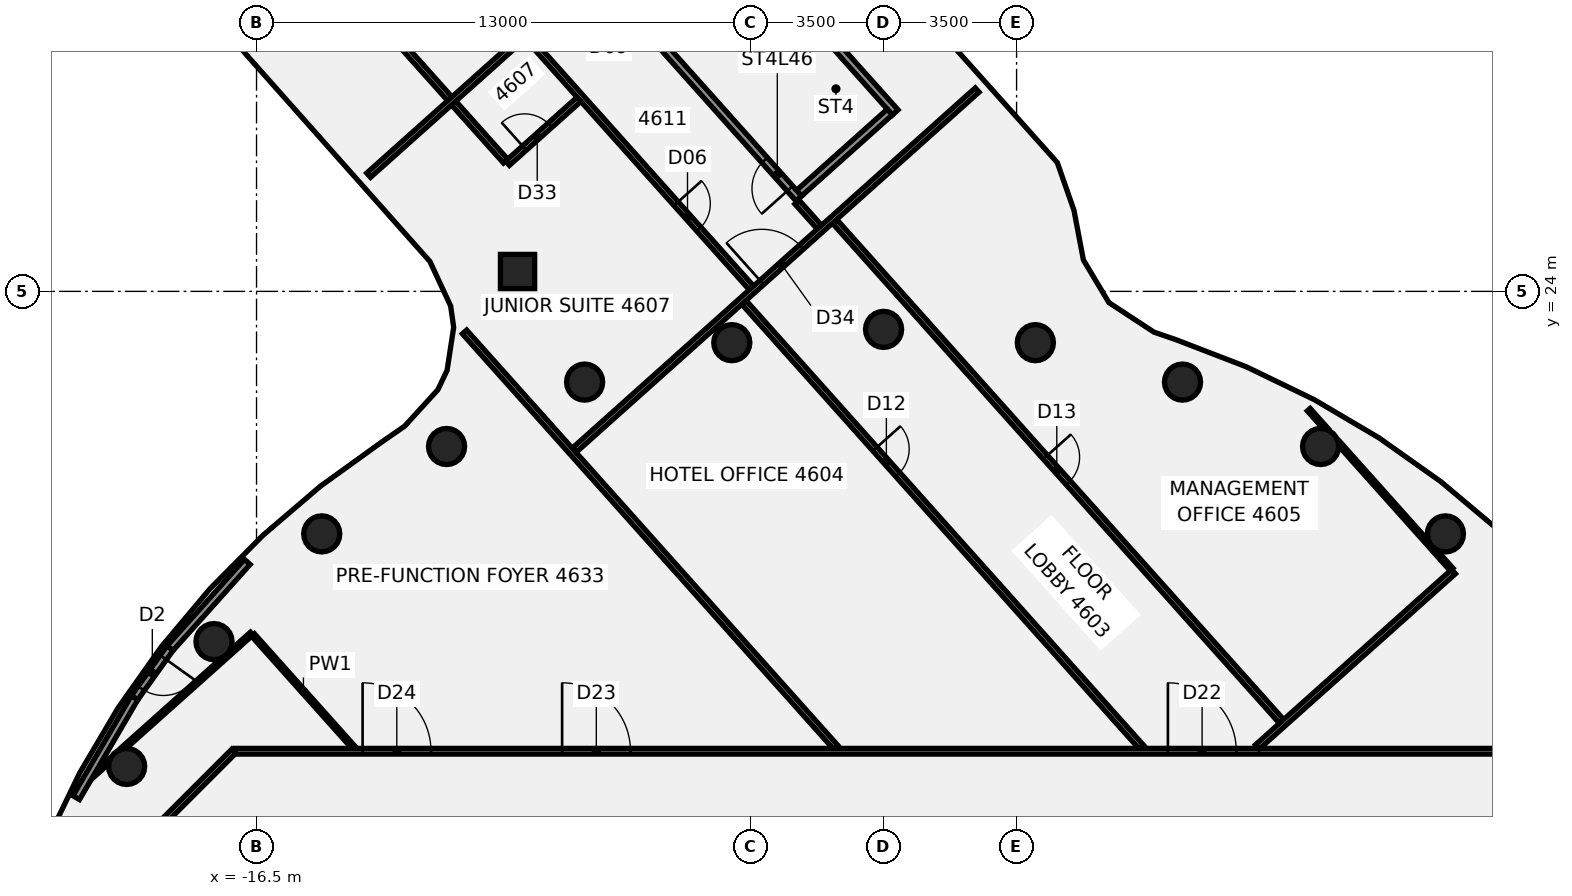
"""IFC4 building model, lengths in metres.
Left out: names, types, materials, properties, quantities, classifications, styles, units other than length and angle.
Written with IfcOpenShell. Run it as: python <this file> out.ifc"""

import sys

from ifc_helpers import new_model, si_unit, direction, frame, frame_2d, origin, origin_2d, place, context, subcontext, project, spatial, rectangle, circle, extrude, element, fill, save


model = new_model("IFC4")
c1 = context("Model", 3, precision=1e-05, world=origin(), true_north=direction((0.0, 1.0)))
c2 = subcontext(c1, "Body", "Model", "MODEL_VIEW")
j1 = project(units=[si_unit("LENGTHUNIT", "METRE"), si_unit("PLANEANGLEUNIT", "RADIAN")], contexts=[c1])
p1 = place(None, origin())
s1 = spatial("IfcSite", under=j1, at=p1, CompositionType="ELEMENT")
p2 = place(p1, origin())
s2 = spatial("IfcBuilding", under=s1, at=p2, CompositionType="ELEMENT")
p3 = place(p2, frame((0.0, 0.0, 186.1)))
s3 = spatial("IfcBuildingStorey", under=s2, at=p3, CompositionType="ELEMENT", Elevation=186.1)
for number, where, z_axis, x_axis in (
    (1, (14.784, 17.619, -0.14), (0.0, 0.0, 1.0), (1.0, 0.0, 0.0)),
    (2, (11.5, 19.919, -0.14), (0.0, 0.0, 1.0), (1.0, 0.0, 0.0)),
    (3, (7.866, 21.613, -0.14), (0.0, 0.0, 1.0), (1.0, 0.0, 0.0)),
    (4, (3.994, 22.651, -0.14), (0.0, 0.0, 1.0), (1.0, 0.0, 0.0)),
    (5, (0.0, 23.0, -0.14), (0.0, 0.0, 1.0), (1.0, 0.0, 0.0)),
    (6, (-3.994, 22.651, -0.14), (0.0, 0.0, 1.0), (1.0, 0.0, 0.0)),
    (7, (-7.866, 21.613, -0.14), (0.0, 0.0, 1.0), (1.0, 0.0, 0.0)),
    (8, (-11.5, 19.919, -0.14), (0.0, 0.0, 1.0), (1.0, 0.0, 0.0)),
    (9, (-14.784, 17.619, -0.14), (0.0, 0.0, 1.0), (1.0, 0.0, 0.0)),
    (10, (-17.619, 14.784, -0.14), (0.0, 0.0, 1.0), (1.0, 0.0, 0.0)),
    (11, (-19.919, 11.5, -0.14), (0.0, 0.0, 1.0), (1.0, 0.0, 0.0)),
):
    element("IfcColumn", number, at=place(p3, frame(where, z_axis=z_axis, x_axis=x_axis)), inside=s3, PredefinedType="COLUMN", context=c2, shape_type="SweptSolid", body=[
        extrude(circle(Radius=0.475, at=origin_2d()), origin(), (0.0, 0.0, 1.0), 3.6),
    ])
p4 = place(p3, frame((-9.632, 24.523, -0.139), z_axis=(-0.012268116842, -0.048801348764, 0.99873315839), x_axis=(0.744800990849, 0.66598299183, 0.041690989716)))
e12 = element("IfcColumn", 12, at=p4, inside=s3, PredefinedType="COLUMN", context=c2, shape_type="SweptSolid", body=[
    extrude(rectangle(XDim=0.9, YDim=0.9, at=origin_2d()), origin(), (0.0, 0.0, 1.0), 3.602),
])
p5 = place(p3, frame((-16.594, 14.959, 0.0), z_axis=(0.0, 0.0, 1.0), x_axis=(0.66652964255, -0.745478527928, 0.0)))
e13 = element("IfcWall", 13, at=p5, inside=s3, PredefinedType="PARTITIONING", context=c2, shape_type="SweptSolid", body=[
    extrude(rectangle(XDim=3.983, YDim=0.1, at=frame_2d((1.991, 0.0))), origin(), (0.0, 0.0, 1.0), 2.864),
])
p6 = place(p3, frame((-15.37, 37.394, 0.0), z_axis=(0.0, 0.0, 1.0), x_axis=(0.666444780656, -0.745554393949, 0.0)))
e14 = element("IfcWall", 14, at=p6, inside=s3, PredefinedType="PARTITIONING", context=c2, shape_type="SweptSolid", body=[
    extrude(rectangle(XDim=17.841, YDim=0.15, at=frame_2d((8.92, 0.0))), origin(), (0.0, 0.0, 1.0), 2.864),
])
p7 = place(p6, frame((14.871, 0.0, 0.0)))
e15 = element("IfcOpeningElement", 15, at=p7, cuts=e14, PredefinedType="OPENING", context=c2, shape_type="SweptSolid", body=[
    extrude(rectangle(XDim=0.9, YDim=2.1, at=frame_2d((0.45, 1.05))), frame((0.0, 0.085, 0.0), z_axis=(0.0, -1.0, 0.0), x_axis=(1.0, 0.0, 0.0)), (0.0, 0.0, 1.0), 0.17),
])
p8 = place(p6, frame((3.82, 0.0, 0.0)))
e16 = element("IfcOpeningElement", 16, at=p8, cuts=e14, PredefinedType="OPENING", context=c2, shape_type="SweptSolid", body=[
    extrude(rectangle(XDim=0.9, YDim=2.1, at=frame_2d((0.45, 1.05))), frame((0.0, 0.085, 0.0), z_axis=(0.0, -1.0, 0.0), x_axis=(1.0, 0.0, 0.0)), (0.0, 0.0, 1.0), 0.17),
])
p9 = place(p3, frame((-2.277, 26.348, 0.0), z_axis=(0.0, 0.0, 1.0), x_axis=(0.666291571948, -0.745691317605, 0.0)))
e17 = element("IfcWall", 17, at=p9, inside=s3, PredefinedType="PARTITIONING", context=c2, shape_type="SweptSolid", body=[
    extrude(rectangle(XDim=0.879, YDim=0.15, at=frame_2d((0.44, 0.0))), origin(), (0.0, 0.0, 1.0), 2.864),
])
p10 = place(p3, frame((-12.78, 30.595, 0.0), z_axis=(0.0, 0.0, 1.0), x_axis=(0.666724335907, -0.745304407547, 0.0)))
e18 = element("IfcWall", 18, at=p10, inside=s3, PredefinedType="PARTITIONING", context=c2, shape_type="SweptSolid", body=[
    extrude(rectangle(XDim=4.25, YDim=0.15, at=frame_2d((2.125, 0.0))), origin(), (0.0, 0.0, 1.0), 2.864),
])
p11 = place(p3, frame((-11.027, 22.932, 0.0), z_axis=(0.0, 0.0, 1.0), x_axis=(0.666397804254, -0.745596383096, 0.0)))
e19 = element("IfcWall", 19, at=p11, inside=s3, PredefinedType="PARTITIONING", context=c2, shape_type="SweptSolid", body=[
    extrude(rectangle(XDim=14.652, YDim=0.15, at=frame_2d((7.326, 0.0))), origin(), (0.0, 0.0, 1.0), 2.864),
])
p12 = place(p3, frame((-3.672, 23.708, 0.0), z_axis=(0.0, 0.0, 1.0), x_axis=(0.666408651831, -0.745586687626, 0.0)))
e20 = element("IfcWall", 20, at=p12, inside=s3, PredefinedType="PARTITIONING", context=c2, shape_type="SweptSolid", body=[
    extrude(rectangle(XDim=15.692, YDim=0.15, at=frame_2d((7.846, 0.0))), origin(), (0.0, 0.0, 1.0), 2.864),
])
p13 = place(p12, frame((5.17, 0.0, 0.0)))
e21 = element("IfcOpeningElement", 21, at=p13, cuts=e20, PredefinedType="OPENING", context=c2, shape_type="SweptSolid", body=[
    extrude(rectangle(XDim=0.9, YDim=2.1, at=frame_2d((0.45, 1.05))), frame((0.0, 0.085, 0.0), z_axis=(0.0, -1.0, 0.0), x_axis=(1.0, 0.0, 0.0)), (0.0, 0.0, 1.0), 0.17),
])
p14 = place(p3, frame((-1.287, 25.839, 0.0), z_axis=(0.0, 0.0, 1.0), x_axis=(0.666445254809, -0.745553970107, 0.0)))
e22 = element("IfcWall", 22, at=p14, inside=s3, PredefinedType="PARTITIONING", context=c2, shape_type="SweptSolid", body=[
    extrude(rectangle(XDim=17.64, YDim=0.15, at=frame_2d((8.82, 0.0))), origin(), (0.0, 0.0, 1.0), 2.864),
])
p15 = place(p14, frame((8.32, 0.0, 0.0)))
e23 = element("IfcOpeningElement", 23, at=p15, cuts=e22, PredefinedType="OPENING", context=c2, shape_type="SweptSolid", body=[
    extrude(rectangle(XDim=0.9, YDim=2.1, at=frame_2d((0.45, 1.05))), frame((0.0, 0.085, 0.0), z_axis=(0.0, -1.0, 0.0), x_axis=(1.0, 0.0, 0.0)), (0.0, 0.0, 1.0), 0.17),
])
p16 = place(p3, frame((11.188, 20.888, 0.0), z_axis=(0.0, 0.0, 1.0), x_axis=(0.666420937465, -0.74557570649, 0.0)))
e24 = element("IfcWall", 24, at=p16, inside=s3, PredefinedType="PARTITIONING", context=c2, shape_type="SweptSolid", body=[
    extrude(rectangle(XDim=0.706, YDim=0.1, at=frame_2d((0.353, 0.0))), origin(), (0.0, 0.0, 1.0), 2.864),
])
p17 = place(p3, frame((11.955, 20.029, 0.0), z_axis=(0.0, 0.0, 1.0), x_axis=(0.666367019428, -0.745623896759, 0.0)))
e25 = element("IfcWall", 25, at=p17, inside=s3, PredefinedType="PARTITIONING", context=c2, shape_type="SweptSolid", body=[
    extrude(rectangle(XDim=4.488, YDim=0.1, at=frame_2d((2.244, 0.0))), origin(), (0.0, 0.0, 1.0), 2.864),
])
p18 = place(p3, frame((-17.065, 11.9, 0.0), z_axis=(0.0, 0.0, 1.0), x_axis=(1.0, 0.0, 0.0)))
e26 = element("IfcWall", 26, at=p18, inside=s3, PredefinedType="PARTITIONING", context=c2, shape_type="SweptSolid", body=[
    extrude(rectangle(XDim=34.165, YDim=0.15, at=frame_2d((17.083, 0.0))), origin(), (0.0, 0.0, 1.0), 2.864),
])
p19 = place(p18, frame((24.547, 0.0, 0.0)))
e27 = element("IfcOpeningElement", 27, at=p19, cuts=e26, PredefinedType="OPENING", context=c2, shape_type="SweptSolid", body=[
    extrude(rectangle(XDim=1.8, YDim=2.1, at=frame_2d((0.9, 1.05))), frame((0.0, 0.085, 0.0), z_axis=(0.0, -1.0, 0.0), x_axis=(1.0, 0.0, 0.0)), (0.0, 0.0, 1.0), 0.17),
])
p20 = place(p18, frame((8.606, 0.0, 0.0)))
e28 = element("IfcOpeningElement", 28, at=p20, cuts=e26, PredefinedType="OPENING", context=c2, shape_type="SweptSolid", body=[
    extrude(rectangle(XDim=1.8, YDim=2.1, at=frame_2d((0.9, 1.05))), frame((0.0, 0.085, 0.0), z_axis=(0.0, -1.0, 0.0), x_axis=(1.0, 0.0, 0.0)), (0.0, 0.0, 1.0), 0.17),
])
p21 = place(p18, frame((3.356, 0.0, 0.0)))
e29 = element("IfcOpeningElement", 29, at=p21, cuts=e26, PredefinedType="OPENING", context=c2, shape_type="SweptSolid", body=[
    extrude(rectangle(XDim=1.8, YDim=2.1, at=frame_2d((0.9, 1.05))), frame((0.0, 0.085, 0.0), z_axis=(0.0, -1.0, 0.0), x_axis=(1.0, 0.0, 0.0)), (0.0, 0.0, 1.0), 0.17),
])
p22 = place(p3, frame((-20.888, 11.188, 0.0), z_axis=(0.0, 0.0, 1.0), x_axis=(0.74557570649, 0.666420937465, 0.0)))
e30 = element("IfcWall", 30, at=p22, inside=s3, PredefinedType="PARTITIONING", context=c2, shape_type="SweptSolid", body=[
    extrude(rectangle(XDim=0.706, YDim=0.1, at=frame_2d((0.353, 0.0))), origin(), (0.0, 0.0, 1.0), 2.864),
])
p23 = place(p3, frame((-20.029, 11.955, 0.0), z_axis=(0.0, 0.0, 1.0), x_axis=(0.745614810603, 0.666377186141, 0.0)))
e31 = element("IfcWall", 31, at=p23, inside=s3, PredefinedType="PARTITIONING", context=c2, shape_type="SweptSolid", body=[
    extrude(rectangle(XDim=4.563, YDim=0.1, at=frame_2d((2.282, 0.0))), origin(), (0.0, 0.0, 1.0), 2.864),
])
p24 = place(p3, frame((-13.55, 27.057, 0.0), z_axis=(0.0, 0.0, 1.0), x_axis=(0.745704850379, 0.666276426208, 0.0)))
e32 = element("IfcWall", 32, at=p24, inside=s3, PredefinedType="PARTITIONING", context=c2, shape_type="SweptSolid", body=[
    extrude(rectangle(XDim=5.453, YDim=0.15, at=frame_2d((2.727, 0.0))), origin(), (0.0, 0.0, 1.0), 2.864),
])
p25 = place(p3, frame((-9.897, 27.371, 0.0), z_axis=(0.0, 0.0, 1.0), x_axis=(0.745631512628, 0.666358497639, 0.0)))
e33 = element("IfcWall", 33, at=p25, inside=s3, PredefinedType="PARTITIONING", context=c2, shape_type="SweptSolid", body=[
    extrude(rectangle(XDim=2.519, YDim=0.15, at=frame_2d((1.26, 0.0))), origin(), (0.0, 0.0, 1.0), 2.864),
])
p26 = place(p25, frame((0.6, 0.0, 0.0)))
e34 = element("IfcOpeningElement", 34, at=p26, cuts=e33, PredefinedType="OPENING", context=c2, shape_type="SweptSolid", body=[
    extrude(rectangle(XDim=0.9, YDim=2.1, at=frame_2d((0.45, 1.05))), frame((0.0, 0.085, 0.0), z_axis=(0.0, -1.0, 0.0), x_axis=(1.0, 0.0, 0.0)), (0.0, 0.0, 1.0), 0.17),
])
p27 = place(p3, frame((-8.139, 19.821, 0.0), z_axis=(0.0, 0.0, 1.0), x_axis=(0.745582042357, 0.666413848982, 0.0)))
e35 = element("IfcWall", 35, at=p27, inside=s3, PredefinedType="PARTITIONING", context=c2, shape_type="SweptSolid", body=[
    extrude(rectangle(XDim=14.219, YDim=0.15, at=frame_2d((7.11, 0.0))), origin(), (0.0, 0.0, 1.0), 2.864),
])
p28 = place(p27, frame((6.62, 0.0, 0.0)))
e36 = element("IfcOpeningElement", 36, at=p28, cuts=e35, PredefinedType="OPENING", context=c2, shape_type="SweptSolid", body=[
    extrude(rectangle(XDim=1.4, YDim=2.1, at=frame_2d((0.7, 1.05))), frame((0.0, 0.085, 0.0), z_axis=(0.0, -1.0, 0.0), x_axis=(1.0, 0.0, 0.0)), (0.0, 0.0, 1.0), 0.17),
])
p29 = place(p3, frame((9.835, 12.013, 0.0), z_axis=(0.0, 0.0, 1.0), x_axis=(0.745799986643, 0.666169933218, 0.0)))
e37 = element("IfcWall", 37, at=p29, inside=s3, PredefinedType="PARTITIONING", context=c2, shape_type="SweptSolid", body=[
    extrude(rectangle(XDim=6.923, YDim=0.15, at=frame_2d((3.461, 0.0))), origin(), (0.0, 0.0, 1.0), 2.864),
])
p30 = place(p3, frame((-18.872, 10.128, 0.0), z_axis=(0.0, 0.0, 1.0), x_axis=(0.707106781187, 0.707106781187, 0.0)))
e38 = element("IfcWall", 38, at=p30, inside=s3, PredefinedType="PARTITIONING", context=c2, shape_type="SweptSolid", body=[
    extrude(rectangle(XDim=2.505, YDim=0.15, at=frame_2d((1.253, 0.0))), origin(), (0.0, 0.0, 1.0), 2.864),
])
p31 = place(p3, frame((-16.743, 16.881, 0.0), z_axis=(0.0, 0.0, 1.0), x_axis=(-0.667237213311, -0.744845286736, 0.0)))
e39 = element("IfcWall", 39, at=p31, inside=s3, PredefinedType="SOLIDWALL", context=c2, shape_type="SweptSolid", body=[
    extrude(rectangle(XDim=3.048, YDim=0.2, at=frame_2d((1.524, 0.0))), origin(), (0.0, 0.0, 1.0), 3.46),
])
p32 = place(p3, frame((-19.708, 13.309, 0.0), z_axis=(0.0, 0.0, 1.0), x_axis=(-0.504682807399, -0.863304849932, 0.0)))
e40 = element("IfcWall", 40, at=p32, inside=s3, PredefinedType="SOLIDWALL", context=c2, shape_type="SweptSolid", body=[
    extrude(rectangle(XDim=3.047, YDim=0.2, at=frame_2d((1.523, 0.0))), origin(), (0.0, 0.0, 1.0), 3.46),
])
p33 = place(p3, frame((-18.777, 14.611, 0.0), z_axis=(0.0, 0.0, 1.0), x_axis=(-0.58162792214, -0.81345495277, 0.0)))
e41 = element("IfcWall", 41, at=p33, inside=s3, PredefinedType="SOLIDWALL", context=c2, shape_type="SweptSolid", body=[
    extrude(rectangle(XDim=1.6, YDim=0.2, at=frame_2d((0.8, 0.0))), origin(), (0.0, 0.0, 1.0), 3.46),
])
p34 = place(p33, frame((0.3, 0.0, 0.0)))
e42 = element("IfcOpeningElement", 42, at=p34, cuts=e41, PredefinedType="OPENING", context=c2, shape_type="SweptSolid", body=[
    extrude(rectangle(XDim=1.0, YDim=2.4, at=frame_2d((0.5, 1.2))), frame((0.0, 0.11, 0.0), z_axis=(0.0, -1.0, 0.0), x_axis=(1.0, 0.0, 0.0)), (0.0, 0.0, 1.0), 0.22),
])
p35 = place(p3, frame((-2.229, 26.445, -0.14), z_axis=(0.0, 0.0, 1.0), x_axis=(-0.666426243164, 0.745570964042, 0.0)))
e43 = element("IfcWall", 43, at=p35, inside=s3, PredefinedType="SHEAR", context=c2, shape_type="SweptSolid", body=[
    extrude(rectangle(XDim=6.7, YDim=0.2, at=frame_2d((3.35, 0.0))), origin(), (0.0, 0.0, 1.0), 3.004),
])
p36 = place(p35, frame((0.35, 0.0, 0.0)))
e44 = element("IfcOpeningElement", 44, at=p36, cuts=e43, PredefinedType="OPENING", context=c2, shape_type="SweptSolid", body=[
    extrude(rectangle(XDim=1.0, YDim=2.1, at=frame_2d((0.5, 1.05))), frame((0.0, 0.11, 0.0), z_axis=(0.0, -1.0, 0.0), x_axis=(1.0, 0.0, 0.0)), (0.0, 0.0, 1.0), 0.22),
])
p37 = place(p3, frame((0.305, 28.711, -0.14), z_axis=(0.0, 0.0, 1.0), x_axis=(-0.666446497792, 0.745552859012, 0.0)))
e45 = element("IfcWall", 45, at=p37, inside=s3, PredefinedType="SHEAR", context=c2, shape_type="SweptSolid", body=[
    extrude(rectangle(XDim=6.7, YDim=0.2, at=frame_2d((3.35, 0.0))), origin(), (0.0, 0.0, 1.0), 3.004),
])
p38 = place(p3, frame((0.164, 28.719, -0.14), z_axis=(0.0, 0.0, 1.0), x_axis=(-0.745520592409, -0.666482592641, 0.0)))
e46 = element("IfcWall", 46, at=p38, inside=s3, PredefinedType="SHEAR", context=c2, shape_type="SweptSolid", body=[
    extrude(rectangle(XDim=3.2, YDim=0.2, at=frame_2d((1.6, 0.0))), origin(), (0.0, 0.0, 1.0), 3.004),
])
p39 = place(p7, frame((0.9, 0.0, 0.0), z_axis=(0.0, 0.0, 1.0), x_axis=(-1.0, 0.0, 0.0)))
e47 = element("IfcDoor", 47, at=p39, inside=s3, OperationType="SINGLE_SWING_RIGHT", PredefinedType="DOOR", context=c2, shape_type="SweptSolid", body=[
    extrude(rectangle(XDim=0.9, YDim=2.1, at=frame_2d((0.45, 1.05))), frame((0.0, 0.025, 0.0), z_axis=(0.0, -1.0, 0.0), x_axis=(1.0, 0.0, 0.0)), (0.0, 0.0, 1.0), 0.05),
])
fill(e15, e47)
p40 = place(p13, frame((0.9, 0.0, 0.0), z_axis=(0.0, 0.0, 1.0), x_axis=(-1.0, 0.0, 0.0)))
e48 = element("IfcDoor", 48, at=p40, inside=s3, OperationType="SINGLE_SWING_LEFT", PredefinedType="DOOR", context=c2, shape_type="SweptSolid", body=[
    extrude(rectangle(XDim=0.9, YDim=2.1, at=frame_2d((0.45, 1.05))), frame((0.0, 0.025, 0.0), z_axis=(0.0, -1.0, 0.0), x_axis=(1.0, 0.0, 0.0)), (0.0, 0.0, 1.0), 0.05),
])
fill(e21, e48)
p41 = place(p15, origin())
e49 = element("IfcDoor", 49, at=p41, inside=s3, OperationType="SINGLE_SWING_RIGHT", PredefinedType="DOOR", context=c2, shape_type="SweptSolid", body=[
    extrude(rectangle(XDim=0.9, YDim=2.1, at=frame_2d((0.45, 1.05))), frame((0.0, 0.025, 0.0), z_axis=(0.0, -1.0, 0.0), x_axis=(1.0, 0.0, 0.0)), (0.0, 0.0, 1.0), 0.05),
])
fill(e23, e49)
p42 = place(p19, frame((1.8, 0.0, 0.0), z_axis=(0.0, 0.0, 1.0), x_axis=(-1.0, 0.0, 0.0)))
e50 = element("IfcDoor", 50, at=p42, inside=s3, OperationType="DOUBLE_DOOR_SINGLE_SWING", PredefinedType="DOOR", context=c2, shape_type="SweptSolid", body=[
    extrude(rectangle(XDim=1.8, YDim=2.1, at=frame_2d((0.9, 1.05))), frame((0.0, 0.025, 0.0), z_axis=(0.0, -1.0, 0.0), x_axis=(1.0, 0.0, 0.0)), (0.0, 0.0, 1.0), 0.05),
])
fill(e27, e50)
p43 = place(p20, origin())
e51 = element("IfcDoor", 51, at=p43, inside=s3, OperationType="DOUBLE_DOOR_SINGLE_SWING", PredefinedType="DOOR", context=c2, shape_type="SweptSolid", body=[
    extrude(rectangle(XDim=1.8, YDim=2.1, at=frame_2d((0.9, 1.05))), frame((0.0, 0.025, 0.0), z_axis=(0.0, -1.0, 0.0), x_axis=(1.0, 0.0, 0.0)), (0.0, 0.0, 1.0), 0.05),
])
fill(e28, e51)
p44 = place(p21, origin())
e52 = element("IfcDoor", 52, at=p44, inside=s3, OperationType="DOUBLE_DOOR_SINGLE_SWING", PredefinedType="DOOR", context=c2, shape_type="SweptSolid", body=[
    extrude(rectangle(XDim=1.8, YDim=2.1, at=frame_2d((0.9, 1.05))), frame((0.0, 0.025, 0.0), z_axis=(0.0, -1.0, 0.0), x_axis=(1.0, 0.0, 0.0)), (0.0, 0.0, 1.0), 0.05),
])
fill(e29, e52)
p45 = place(p26, origin())
e53 = element("IfcDoor", 53, at=p45, inside=s3, OperationType="SINGLE_SWING_RIGHT", PredefinedType="DOOR", context=c2, shape_type="SweptSolid", body=[
    extrude(rectangle(XDim=0.9, YDim=2.1, at=frame_2d((0.45, 1.05))), frame((0.0, 0.025, 0.0), z_axis=(0.0, -1.0, 0.0), x_axis=(1.0, 0.0, 0.0)), (0.0, 0.0, 1.0), 0.05),
])
fill(e34, e53)
p46 = place(p28, frame((1.4, 0.0, 0.0), z_axis=(0.0, 0.0, 1.0), x_axis=(-1.0, 0.0, 0.0)))
e54 = element("IfcDoor", 54, at=p46, inside=s3, OperationType="DOUBLE_DOOR_SINGLE_SWING", PredefinedType="DOOR", context=c2, shape_type="SweptSolid", body=[
    extrude(rectangle(XDim=1.4, YDim=2.1, at=frame_2d((0.7, 1.05))), frame((0.0, 0.025, 0.0), z_axis=(0.0, -1.0, 0.0), x_axis=(1.0, 0.0, 0.0)), (0.0, 0.0, 1.0), 0.05),
])
fill(e36, e54)
p47 = place(p34, origin())
e55 = element("IfcDoor", 55, at=p47, inside=s3, OperationType="SINGLE_SWING_LEFT", PredefinedType="DOOR", context=c2, shape_type="SweptSolid", body=[
    extrude(rectangle(XDim=1.0, YDim=2.4, at=frame_2d((0.5, 1.2))), frame((0.0, 0.025, 0.0), z_axis=(0.0, -1.0, 0.0), x_axis=(1.0, 0.0, 0.0)), (0.0, 0.0, 1.0), 0.05),
])
fill(e42, e55)
p48 = place(p36, origin())
e56 = element("IfcDoor", 56, at=p48, inside=s3, OperationType="SINGLE_SWING_LEFT", PredefinedType="DOOR", context=c2, shape_type="SweptSolid", body=[
    extrude(rectangle(XDim=1.0, YDim=2.1, at=frame_2d((0.5, 1.05))), frame((0.0, 0.025, 0.0), z_axis=(0.0, -1.0, 0.0), x_axis=(1.0, 0.0, 0.0)), (0.0, 0.0, 1.0), 0.05),
])
fill(e44, e56)
save(model, sys.argv[1])
